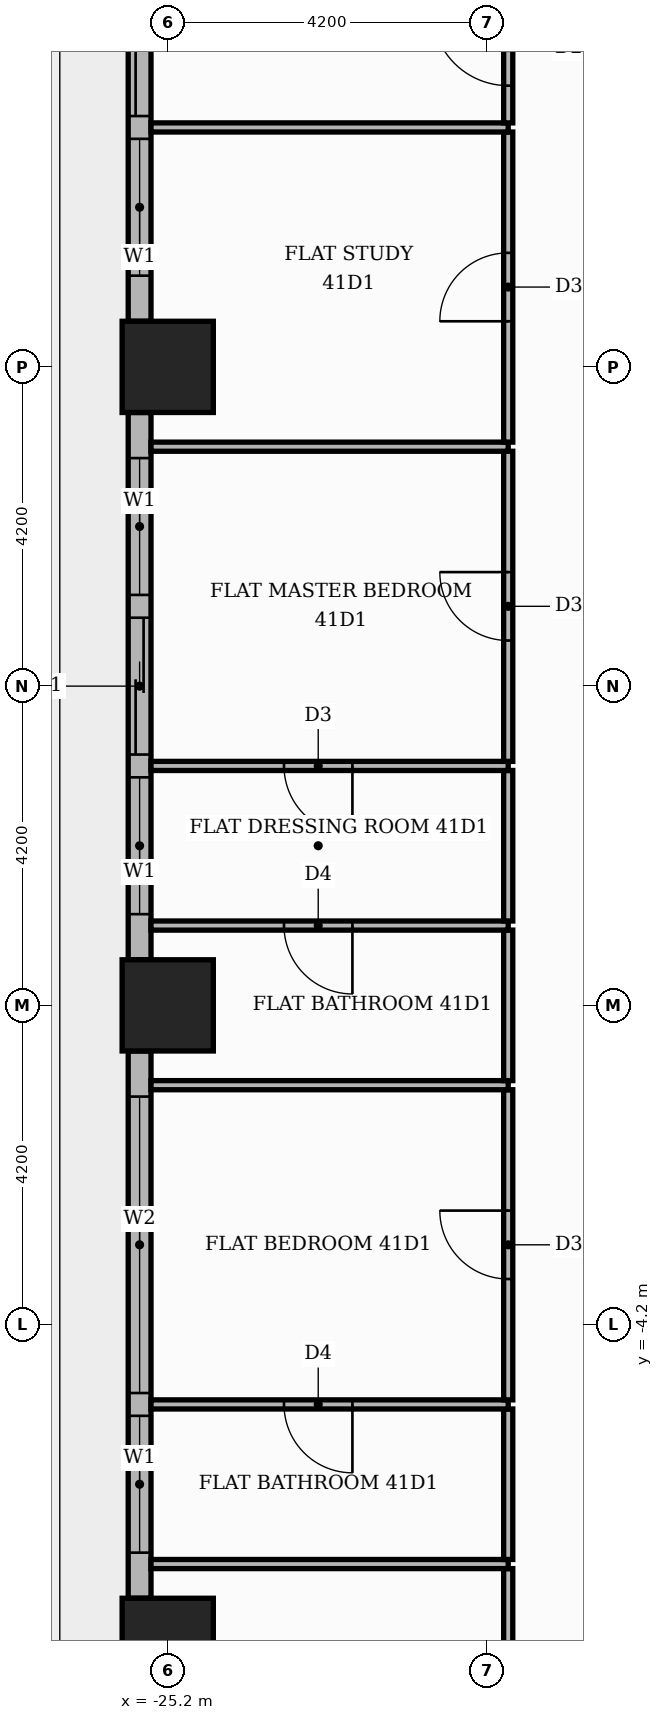
"""IFC4 building model, lengths in metres.
Left out: names, types, materials, properties, quantities, classifications, styles, units other than length and angle.
Written with IfcOpenShell. Run it as: python <this file> out.ifc"""

import sys

from ifc_helpers import new_model, si_unit, direction, frame, frame_2d, origin, origin_2d, place, context, subcontext, project, spatial, rectangle, extrude, element, fill, save


model = new_model("IFC4")
c1 = context("Model", 3, precision=1e-05, world=origin(), true_north=direction((0.0, 1.0)))
c2 = subcontext(c1, "Body", "Model", "MODEL_VIEW")
j1 = project(units=[si_unit("LENGTHUNIT", "METRE"), si_unit("PLANEANGLEUNIT", "RADIAN")], contexts=[c1])
p1 = place(None, origin())
s1 = spatial("IfcSite", under=j1, at=p1, CompositionType="ELEMENT")
p2 = place(p1, origin())
s2 = spatial("IfcBuilding", under=s1, at=p2, CompositionType="ELEMENT")
p3 = place(p2, frame((0.0, 0.0, 172.8)))
s3 = spatial("IfcBuildingStorey", under=s2, at=p3, CompositionType="ELEMENT", Elevation=172.8)
for number, where, z_axis, x_axis in (
    (1, (-25.2, 0.0, 0.0), (0.0, 0.0, 1.0), (1.0, 0.0, 0.0)),
    (2, (-25.2, -8.4, 0.0), (0.0, 0.0, 1.0), (1.0, 0.0, 0.0)),
    (3, (-25.2, 8.4, 0.0), (0.0, 0.0, 1.0), (1.0, 0.0, 0.0)),
):
    element("IfcColumn", number, at=place(p3, frame(where, z_axis=z_axis, x_axis=x_axis)), inside=s3, PredefinedType="COLUMN", context=c2, shape_type="SweptSolid", body=[
        extrude(rectangle(XDim=1.2, YDim=1.2, at=origin_2d()), origin(), (0.0, 0.0, 1.0), 3.9),
    ])
p4 = place(p3, frame((-25.57, 16.2, 0.0), z_axis=(0.0, 0.0, 1.0), x_axis=(0.0, -1.0, 0.0)))
e4 = element("IfcWall", 4, at=p4, inside=s3, PredefinedType="STANDARD", context=c2, shape_type="SweptSolid", body=[
    extrude(rectangle(XDim=7.2, YDim=0.3, at=frame_2d((3.6, 0.0))), origin(), (0.0, 0.0, 1.0), 3.48),
])
p5 = place(p4, frame((0.6, 0.0, 0.0)))
e5 = element("IfcOpeningElement", 5, at=p5, cuts=e4, PredefinedType="OPENING", context=c2, shape_type="SweptSolid", body=[
    extrude(rectangle(XDim=3.9, YDim=2.4, at=frame_2d((1.95, 1.2))), frame((0.0, 0.16, 0.0), z_axis=(0.0, -1.0, 0.0), x_axis=(1.0, 0.0, 0.0)), (0.0, 0.0, 1.0), 0.32),
])
p6 = place(p4, frame((4.8, 0.0, 0.9)))
e6 = element("IfcOpeningElement", 6, at=p6, cuts=e4, PredefinedType="OPENING", context=c2, shape_type="SweptSolid", body=[
    extrude(rectangle(XDim=1.8, YDim=2.1, at=frame_2d((0.9, 1.05))), frame((0.0, 0.16, 0.0), z_axis=(0.0, -1.0, 0.0), x_axis=(1.0, 0.0, 0.0)), (0.0, 0.0, 1.0), 0.32),
])
p7 = place(p3, frame((-25.57, 7.8, 0.0), z_axis=(0.0, 0.0, 1.0), x_axis=(0.0, -1.0, 0.0)))
e7 = element("IfcWall", 7, at=p7, inside=s3, PredefinedType="STANDARD", context=c2, shape_type="SweptSolid", body=[
    extrude(rectangle(XDim=7.2, YDim=0.3, at=frame_2d((3.6, 0.0))), origin(), (0.0, 0.0, 1.0), 3.48),
])
p8 = place(p7, frame((0.6, 0.0, 0.9)))
e8 = element("IfcOpeningElement", 8, at=p8, cuts=e7, PredefinedType="OPENING", context=c2, shape_type="SweptSolid", body=[
    extrude(rectangle(XDim=1.8, YDim=2.1, at=frame_2d((0.9, 1.05))), frame((0.0, 0.16, 0.0), z_axis=(0.0, -1.0, 0.0), x_axis=(1.0, 0.0, 0.0)), (0.0, 0.0, 1.0), 0.32),
])
p9 = place(p7, frame((2.7, 0.0, 0.0)))
e9 = element("IfcOpeningElement", 9, at=p9, cuts=e7, PredefinedType="OPENING", context=c2, shape_type="SweptSolid", body=[
    extrude(rectangle(XDim=1.8, YDim=2.4, at=frame_2d((0.9, 1.2))), frame((0.0, 0.16, 0.0), z_axis=(0.0, -1.0, 0.0), x_axis=(1.0, 0.0, 0.0)), (0.0, 0.0, 1.0), 0.32),
])
p10 = place(p7, frame((4.8, 0.0, 0.9)))
e10 = element("IfcOpeningElement", 10, at=p10, cuts=e7, PredefinedType="OPENING", context=c2, shape_type="SweptSolid", body=[
    extrude(rectangle(XDim=1.8, YDim=2.1, at=frame_2d((0.9, 1.05))), frame((0.0, 0.16, 0.0), z_axis=(0.0, -1.0, 0.0), x_axis=(1.0, 0.0, 0.0)), (0.0, 0.0, 1.0), 0.32),
])
p11 = place(p3, frame((-25.57, -0.6, 0.0), z_axis=(0.0, 0.0, 1.0), x_axis=(0.0, -1.0, 0.0)))
e11 = element("IfcWall", 11, at=p11, inside=s3, PredefinedType="STANDARD", context=c2, shape_type="SweptSolid", body=[
    extrude(rectangle(XDim=7.2, YDim=0.3, at=frame_2d((3.6, 0.0))), origin(), (0.0, 0.0, 1.0), 3.48),
])
p12 = place(p11, frame((0.6, 0.0, 0.9)))
e12 = element("IfcOpeningElement", 12, at=p12, cuts=e11, PredefinedType="OPENING", context=c2, shape_type="SweptSolid", body=[
    extrude(rectangle(XDim=3.9, YDim=2.1, at=frame_2d((1.95, 1.05))), frame((0.0, 0.16, 0.0), z_axis=(0.0, -1.0, 0.0), x_axis=(1.0, 0.0, 0.0)), (0.0, 0.0, 1.0), 0.32),
])
p13 = place(p11, frame((4.8, 0.0, 0.9)))
e13 = element("IfcOpeningElement", 13, at=p13, cuts=e11, PredefinedType="OPENING", context=c2, shape_type="SweptSolid", body=[
    extrude(rectangle(XDim=1.8, YDim=2.1, at=frame_2d((0.9, 1.05))), frame((0.0, 0.16, 0.0), z_axis=(0.0, -1.0, 0.0), x_axis=(1.0, 0.0, 0.0)), (0.0, 0.0, 1.0), 0.32),
])
p14 = place(p3, frame((-20.72, -11.49, 0.0), z_axis=(0.0, 0.0, 1.0), x_axis=(0.0, 1.0, 0.0)))
e14 = element("IfcWall", 14, at=p14, inside=s3, PredefinedType="PARTITIONING", context=c2, shape_type="SweptSolid", body=[
    extrude(rectangle(XDim=4.08, YDim=0.12, at=frame_2d((2.04, 0.0))), origin(), (0.0, 0.0, 1.0), 3.48),
])
p15 = place(p14, frame((1.59, 0.0, 0.0)))
e15 = element("IfcOpeningElement", 15, at=p15, cuts=e14, PredefinedType="OPENING", context=c2, shape_type="SweptSolid", body=[
    extrude(rectangle(XDim=0.9, YDim=2.1, at=frame_2d((0.45, 1.05))), frame((0.0, 0.07, 0.0), z_axis=(0.0, -1.0, 0.0), x_axis=(1.0, 0.0, 0.0)), (0.0, 0.0, 1.0), 0.14),
])
p16 = place(p3, frame((-25.42, -7.35, 0.0), z_axis=(0.0, 0.0, 1.0), x_axis=(1.0, 0.0, 0.0)))
e16 = element("IfcWall", 16, at=p16, inside=s3, PredefinedType="PARTITIONING", context=c2, shape_type="SweptSolid", body=[
    extrude(rectangle(XDim=4.7, YDim=0.12, at=frame_2d((2.35, 0.0))), origin(), (0.0, 0.0, 1.0), 3.48),
])
p17 = place(p3, frame((-20.72, -7.29, 0.0), z_axis=(0.0, 0.0, 1.0), x_axis=(0.0, 1.0, 0.0)))
e17 = element("IfcWall", 17, at=p17, inside=s3, PredefinedType="PARTITIONING", context=c2, shape_type="SweptSolid", body=[
    extrude(rectangle(XDim=1.98, YDim=0.12, at=frame_2d((0.99, 0.0))), origin(), (0.0, 0.0, 1.0), 3.48),
])
p18 = place(p3, frame((-25.42, -5.25, 0.0), z_axis=(0.0, 0.0, 1.0), x_axis=(1.0, 0.0, 0.0)))
e18 = element("IfcWall", 18, at=p18, inside=s3, PredefinedType="PARTITIONING", context=c2, shape_type="SweptSolid", body=[
    extrude(rectangle(XDim=4.7, YDim=0.12, at=frame_2d((2.35, 0.0))), origin(), (0.0, 0.0, 1.0), 3.48),
])
p19 = place(p18, frame((1.75, 0.0, 0.0)))
e19 = element("IfcOpeningElement", 19, at=p19, cuts=e18, PredefinedType="OPENING", context=c2, shape_type="SweptSolid", body=[
    extrude(rectangle(XDim=0.9, YDim=2.1, at=frame_2d((0.45, 1.05))), frame((0.0, 0.07, 0.0), z_axis=(0.0, -1.0, 0.0), x_axis=(1.0, 0.0, 0.0)), (0.0, 0.0, 1.0), 0.14),
])
p20 = place(p3, frame((-20.72, -5.19, 0.0), z_axis=(0.0, 0.0, 1.0), x_axis=(0.0, 1.0, 0.0)))
e20 = element("IfcWall", 20, at=p20, inside=s3, PredefinedType="PARTITIONING", context=c2, shape_type="SweptSolid", body=[
    extrude(rectangle(XDim=4.08, YDim=0.12, at=frame_2d((2.04, 0.0))), origin(), (0.0, 0.0, 1.0), 3.48),
])
p21 = place(p20, frame((1.59, 0.0, 0.0)))
e21 = element("IfcOpeningElement", 21, at=p21, cuts=e20, PredefinedType="OPENING", context=c2, shape_type="SweptSolid", body=[
    extrude(rectangle(XDim=0.9, YDim=2.1, at=frame_2d((0.45, 1.05))), frame((0.0, 0.07, 0.0), z_axis=(0.0, -1.0, 0.0), x_axis=(1.0, 0.0, 0.0)), (0.0, 0.0, 1.0), 0.14),
])
p22 = place(p3, frame((-25.42, -1.05, 0.0), z_axis=(0.0, 0.0, 1.0), x_axis=(1.0, 0.0, 0.0)))
e22 = element("IfcWall", 22, at=p22, inside=s3, PredefinedType="PARTITIONING", context=c2, shape_type="SweptSolid", body=[
    extrude(rectangle(XDim=4.7, YDim=0.12, at=frame_2d((2.35, 0.0))), origin(), (0.0, 0.0, 1.0), 3.48),
])
p23 = place(p3, frame((-20.72, -0.99, 0.0), z_axis=(0.0, 0.0, 1.0), x_axis=(0.0, 1.0, 0.0)))
e23 = element("IfcWall", 23, at=p23, inside=s3, PredefinedType="PARTITIONING", context=c2, shape_type="SweptSolid", body=[
    extrude(rectangle(XDim=1.98, YDim=0.12, at=frame_2d((0.99, 0.0))), origin(), (0.0, 0.0, 1.0), 3.48),
])
p24 = place(p3, frame((-25.42, 1.05, 0.0), z_axis=(0.0, 0.0, 1.0), x_axis=(1.0, 0.0, 0.0)))
e24 = element("IfcWall", 24, at=p24, inside=s3, PredefinedType="PARTITIONING", context=c2, shape_type="SweptSolid", body=[
    extrude(rectangle(XDim=4.7, YDim=0.12, at=frame_2d((2.35, 0.0))), origin(), (0.0, 0.0, 1.0), 3.48),
])
p25 = place(p24, frame((1.75, 0.0, 0.0)))
e25 = element("IfcOpeningElement", 25, at=p25, cuts=e24, PredefinedType="OPENING", context=c2, shape_type="SweptSolid", body=[
    extrude(rectangle(XDim=0.9, YDim=2.1, at=frame_2d((0.45, 1.05))), frame((0.0, 0.07, 0.0), z_axis=(0.0, -1.0, 0.0), x_axis=(1.0, 0.0, 0.0)), (0.0, 0.0, 1.0), 0.14),
])
p26 = place(p3, frame((-20.72, 1.11, 0.0), z_axis=(0.0, 0.0, 1.0), x_axis=(0.0, 1.0, 0.0)))
e26 = element("IfcWall", 26, at=p26, inside=s3, PredefinedType="PARTITIONING", context=c2, shape_type="SweptSolid", body=[
    extrude(rectangle(XDim=1.98, YDim=0.12, at=frame_2d((0.99, 0.0))), origin(), (0.0, 0.0, 1.0), 3.48),
])
p27 = place(p3, frame((-25.42, 3.15, 0.0), z_axis=(0.0, 0.0, 1.0), x_axis=(1.0, 0.0, 0.0)))
e27 = element("IfcWall", 27, at=p27, inside=s3, PredefinedType="PARTITIONING", context=c2, shape_type="SweptSolid", body=[
    extrude(rectangle(XDim=4.7, YDim=0.12, at=frame_2d((2.35, 0.0))), origin(), (0.0, 0.0, 1.0), 3.48),
])
p28 = place(p27, frame((1.75, 0.0, 0.0)))
e28 = element("IfcOpeningElement", 28, at=p28, cuts=e27, PredefinedType="OPENING", context=c2, shape_type="SweptSolid", body=[
    extrude(rectangle(XDim=0.9, YDim=2.1, at=frame_2d((0.45, 1.05))), frame((0.0, 0.07, 0.0), z_axis=(0.0, -1.0, 0.0), x_axis=(1.0, 0.0, 0.0)), (0.0, 0.0, 1.0), 0.14),
])
p29 = place(p3, frame((-20.72, 3.21, 0.0), z_axis=(0.0, 0.0, 1.0), x_axis=(0.0, 1.0, 0.0)))
e29 = element("IfcWall", 29, at=p29, inside=s3, PredefinedType="PARTITIONING", context=c2, shape_type="SweptSolid", body=[
    extrude(rectangle(XDim=4.08, YDim=0.12, at=frame_2d((2.04, 0.0))), origin(), (0.0, 0.0, 1.0), 3.48),
])
p30 = place(p29, frame((1.59, 0.0, 0.0)))
e30 = element("IfcOpeningElement", 30, at=p30, cuts=e29, PredefinedType="OPENING", context=c2, shape_type="SweptSolid", body=[
    extrude(rectangle(XDim=0.9, YDim=2.1, at=frame_2d((0.45, 1.05))), frame((0.0, 0.07, 0.0), z_axis=(0.0, -1.0, 0.0), x_axis=(1.0, 0.0, 0.0)), (0.0, 0.0, 1.0), 0.14),
])
p31 = place(p3, frame((-25.42, 7.35, 0.0), z_axis=(0.0, 0.0, 1.0), x_axis=(1.0, 0.0, 0.0)))
e31 = element("IfcWall", 31, at=p31, inside=s3, PredefinedType="PARTITIONING", context=c2, shape_type="SweptSolid", body=[
    extrude(rectangle(XDim=4.7, YDim=0.12, at=frame_2d((2.35, 0.0))), origin(), (0.0, 0.0, 1.0), 3.48),
])
p32 = place(p3, frame((-20.72, 7.41, 0.0), z_axis=(0.0, 0.0, 1.0), x_axis=(0.0, 1.0, 0.0)))
e32 = element("IfcWall", 32, at=p32, inside=s3, PredefinedType="PARTITIONING", context=c2, shape_type="SweptSolid", body=[
    extrude(rectangle(XDim=4.08, YDim=0.12, at=frame_2d((2.04, 0.0))), origin(), (0.0, 0.0, 1.0), 3.48),
])
p33 = place(p32, frame((1.59, 0.0, 0.0)))
e33 = element("IfcOpeningElement", 33, at=p33, cuts=e32, PredefinedType="OPENING", context=c2, shape_type="SweptSolid", body=[
    extrude(rectangle(XDim=0.9, YDim=2.1, at=frame_2d((0.45, 1.05))), frame((0.0, 0.07, 0.0), z_axis=(0.0, -1.0, 0.0), x_axis=(1.0, 0.0, 0.0)), (0.0, 0.0, 1.0), 0.14),
])
p34 = place(p3, frame((-25.42, 11.55, 0.0), z_axis=(0.0, 0.0, 1.0), x_axis=(1.0, 0.0, 0.0)))
e34 = element("IfcWall", 34, at=p34, inside=s3, PredefinedType="PARTITIONING", context=c2, shape_type="SweptSolid", body=[
    extrude(rectangle(XDim=4.7, YDim=0.12, at=frame_2d((2.35, 0.0))), origin(), (0.0, 0.0, 1.0), 3.48),
])
p35 = place(p3, frame((-20.72, 11.61, 0.0), z_axis=(0.0, 0.0, 1.0), x_axis=(0.0, 1.0, 0.0)))
e35 = element("IfcWall", 35, at=p35, inside=s3, PredefinedType="PARTITIONING", context=c2, shape_type="SweptSolid", body=[
    extrude(rectangle(XDim=1.98, YDim=0.12, at=frame_2d((0.99, 0.0))), origin(), (0.0, 0.0, 1.0), 3.48),
])
p36 = place(p35, frame((0.49, 0.0, 0.0)))
e36 = element("IfcOpeningElement", 36, at=p36, cuts=e35, PredefinedType="OPENING", context=c2, shape_type="SweptSolid", body=[
    extrude(rectangle(XDim=1.0, YDim=2.1, at=frame_2d((0.5, 1.05))), frame((0.0, 0.07, 0.0), z_axis=(0.0, -1.0, 0.0), x_axis=(1.0, 0.0, 0.0)), (0.0, 0.0, 1.0), 0.14),
])
p37 = place(p5, origin())
e37 = element("IfcDoor", 37, at=p37, inside=s3, OperationType="SLIDING_TO_LEFT", PredefinedType="DOOR", context=c2, shape_type="SweptSolid", body=[
    extrude(rectangle(XDim=3.9, YDim=2.4, at=frame_2d((1.95, 1.2))), frame((0.0, 0.025, 0.0), z_axis=(0.0, -1.0, 0.0), x_axis=(1.0, 0.0, 0.0)), (0.0, 0.0, 1.0), 0.05),
])
fill(e5, e37)
p38 = place(p6, origin())
e38 = element("IfcWindow", 38, at=p38, inside=s3, PartitioningType="SINGLE_PANEL", PredefinedType="WINDOW", context=c2, shape_type="SweptSolid", body=[
    extrude(rectangle(XDim=1.8, YDim=2.1, at=frame_2d((0.9, 1.05))), frame((0.0, 0.03, 0.0), z_axis=(0.0, -1.0, 0.0), x_axis=(1.0, 0.0, 0.0)), (0.0, 0.0, 1.0), 0.06),
])
fill(e6, e38)
p39 = place(p8, origin())
e39 = element("IfcWindow", 39, at=p39, inside=s3, PartitioningType="SINGLE_PANEL", PredefinedType="WINDOW", context=c2, shape_type="SweptSolid", body=[
    extrude(rectangle(XDim=1.8, YDim=2.1, at=frame_2d((0.9, 1.05))), frame((0.0, 0.03, 0.0), z_axis=(0.0, -1.0, 0.0), x_axis=(1.0, 0.0, 0.0)), (0.0, 0.0, 1.0), 0.06),
])
fill(e8, e39)
p40 = place(p9, origin())
e40 = element("IfcDoor", 40, at=p40, inside=s3, OperationType="SLIDING_TO_LEFT", PredefinedType="DOOR", context=c2, shape_type="SweptSolid", body=[
    extrude(rectangle(XDim=1.8, YDim=2.4, at=frame_2d((0.9, 1.2))), frame((0.0, 0.025, 0.0), z_axis=(0.0, -1.0, 0.0), x_axis=(1.0, 0.0, 0.0)), (0.0, 0.0, 1.0), 0.05),
])
fill(e9, e40)
p41 = place(p10, origin())
e41 = element("IfcWindow", 41, at=p41, inside=s3, PartitioningType="SINGLE_PANEL", PredefinedType="WINDOW", context=c2, shape_type="SweptSolid", body=[
    extrude(rectangle(XDim=1.8, YDim=2.1, at=frame_2d((0.9, 1.05))), frame((0.0, 0.03, 0.0), z_axis=(0.0, -1.0, 0.0), x_axis=(1.0, 0.0, 0.0)), (0.0, 0.0, 1.0), 0.06),
])
fill(e10, e41)
p42 = place(p12, origin())
e42 = element("IfcWindow", 42, at=p42, inside=s3, PartitioningType="SINGLE_PANEL", PredefinedType="WINDOW", context=c2, shape_type="SweptSolid", body=[
    extrude(rectangle(XDim=3.9, YDim=2.1, at=frame_2d((1.95, 1.05))), frame((0.0, 0.03, 0.0), z_axis=(0.0, -1.0, 0.0), x_axis=(1.0, 0.0, 0.0)), (0.0, 0.0, 1.0), 0.06),
])
fill(e12, e42)
p43 = place(p13, origin())
e43 = element("IfcWindow", 43, at=p43, inside=s3, PartitioningType="SINGLE_PANEL", PredefinedType="WINDOW", context=c2, shape_type="SweptSolid", body=[
    extrude(rectangle(XDim=1.8, YDim=2.1, at=frame_2d((0.9, 1.05))), frame((0.0, 0.03, 0.0), z_axis=(0.0, -1.0, 0.0), x_axis=(1.0, 0.0, 0.0)), (0.0, 0.0, 1.0), 0.06),
])
fill(e13, e43)
p44 = place(p36, origin())
e44 = element("IfcDoor", 44, at=p44, inside=s3, OperationType="SINGLE_SWING_RIGHT", PredefinedType="DOOR", context=c2, shape_type="SweptSolid", body=[
    extrude(rectangle(XDim=1.0, YDim=2.1, at=frame_2d((0.5, 1.05))), frame((0.0, 0.025, 0.0), z_axis=(0.0, -1.0, 0.0), x_axis=(1.0, 0.0, 0.0)), (0.0, 0.0, 1.0), 0.05),
])
fill(e36, e44)
p45 = place(p33, origin())
e45 = element("IfcDoor", 45, at=p45, inside=s3, OperationType="SINGLE_SWING_LEFT", PredefinedType="DOOR", context=c2, shape_type="SweptSolid", body=[
    extrude(rectangle(XDim=0.9, YDim=2.1, at=frame_2d((0.45, 1.05))), frame((0.0, 0.025, 0.0), z_axis=(0.0, -1.0, 0.0), x_axis=(1.0, 0.0, 0.0)), (0.0, 0.0, 1.0), 0.05),
])
fill(e33, e45)
p46 = place(p30, origin())
e46 = element("IfcDoor", 46, at=p46, inside=s3, OperationType="SINGLE_SWING_RIGHT", PredefinedType="DOOR", context=c2, shape_type="SweptSolid", body=[
    extrude(rectangle(XDim=0.9, YDim=2.1, at=frame_2d((0.45, 1.05))), frame((0.0, 0.025, 0.0), z_axis=(0.0, -1.0, 0.0), x_axis=(1.0, 0.0, 0.0)), (0.0, 0.0, 1.0), 0.05),
])
fill(e30, e46)
p47 = place(p28, frame((0.9, 0.0, 0.0), z_axis=(0.0, 0.0, 1.0), x_axis=(-1.0, 0.0, 0.0)))
e47 = element("IfcDoor", 47, at=p47, inside=s3, OperationType="SINGLE_SWING_RIGHT", PredefinedType="DOOR", context=c2, shape_type="SweptSolid", body=[
    extrude(rectangle(XDim=0.9, YDim=2.1, at=frame_2d((0.45, 1.05))), frame((0.0, 0.025, 0.0), z_axis=(0.0, -1.0, 0.0), x_axis=(1.0, 0.0, 0.0)), (0.0, 0.0, 1.0), 0.05),
])
fill(e28, e47)
p48 = place(p25, frame((0.9, 0.0, 0.0), z_axis=(0.0, 0.0, 1.0), x_axis=(-1.0, 0.0, 0.0)))
e48 = element("IfcDoor", 48, at=p48, inside=s3, OperationType="SINGLE_SWING_RIGHT", PredefinedType="DOOR", context=c2, shape_type="SweptSolid", body=[
    extrude(rectangle(XDim=0.9, YDim=2.1, at=frame_2d((0.45, 1.05))), frame((0.0, 0.025, 0.0), z_axis=(0.0, -1.0, 0.0), x_axis=(1.0, 0.0, 0.0)), (0.0, 0.0, 1.0), 0.05),
])
fill(e25, e48)
p49 = place(p21, origin())
e49 = element("IfcDoor", 49, at=p49, inside=s3, OperationType="SINGLE_SWING_RIGHT", PredefinedType="DOOR", context=c2, shape_type="SweptSolid", body=[
    extrude(rectangle(XDim=0.9, YDim=2.1, at=frame_2d((0.45, 1.05))), frame((0.0, 0.025, 0.0), z_axis=(0.0, -1.0, 0.0), x_axis=(1.0, 0.0, 0.0)), (0.0, 0.0, 1.0), 0.05),
])
fill(e21, e49)
p50 = place(p19, frame((0.9, 0.0, 0.0), z_axis=(0.0, 0.0, 1.0), x_axis=(-1.0, 0.0, 0.0)))
e50 = element("IfcDoor", 50, at=p50, inside=s3, OperationType="SINGLE_SWING_RIGHT", PredefinedType="DOOR", context=c2, shape_type="SweptSolid", body=[
    extrude(rectangle(XDim=0.9, YDim=2.1, at=frame_2d((0.45, 1.05))), frame((0.0, 0.025, 0.0), z_axis=(0.0, -1.0, 0.0), x_axis=(1.0, 0.0, 0.0)), (0.0, 0.0, 1.0), 0.05),
])
fill(e19, e50)
save(model, sys.argv[1])
